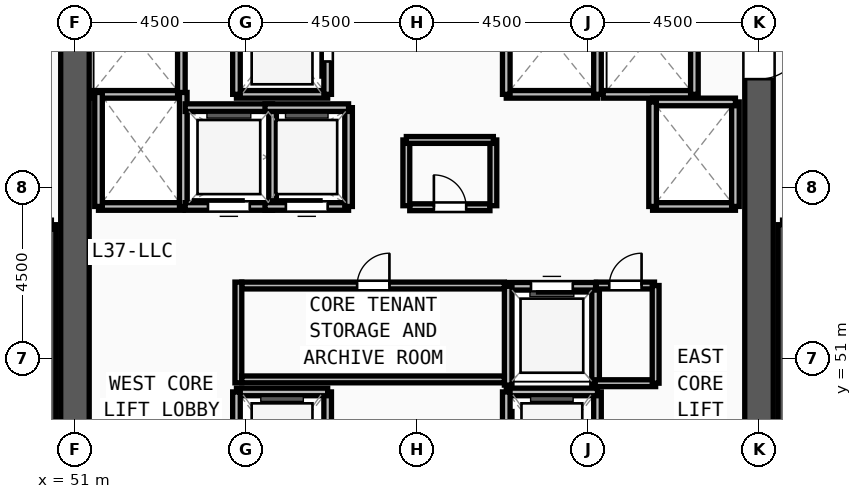
"""IFC4 building model, lengths in metres.
Left out: names, types, materials, properties, quantities, classifications, styles, units other than length and angle.
Written with IfcOpenShell. Run it as: python <this file> out.ifc"""

import sys

from ifc_helpers import new_model, si_unit, direction, frame, frame_2d, origin, place, context, subcontext, project, spatial, rectangle, extrude, source, transform, mapped, element, fill, save


model = new_model("IFC4")
c1 = context("Model", 3, precision=1e-05, world=origin(), true_north=direction((0.0, 1.0)))
c2 = subcontext(c1, "Body", "Model", "MODEL_VIEW")
j1 = project(units=[si_unit("LENGTHUNIT", "METRE"), si_unit("PLANEANGLEUNIT", "RADIAN")], contexts=[c1])
p1 = place(None, origin())
s1 = spatial("IfcSite", under=j1, at=p1, CompositionType="ELEMENT")
p2 = place(p1, origin())
s2 = spatial("IfcBuilding", under=s1, at=p2, CompositionType="ELEMENT")
p3 = place(p2, frame((0.0, 0.0, 144.0)))
s3 = spatial("IfcBuildingStorey", under=s2, at=p3, CompositionType="ELEMENT", Elevation=144.0)
p4 = place(p3, frame((69.0, 60.75, 0.0), z_axis=(0.0, 0.0, 1.0), x_axis=(0.0, -1.0, 0.0)))
e1 = element("IfcWall", 1, at=p4, inside=s3, PredefinedType="SHEAR", context=c2, shape_type="SweptSolid", body=[
    extrude(rectangle(XDim=13.5, YDim=0.75, at=frame_2d((6.75, 0.0))), origin(), (0.0, 0.0, 1.0), 3.57),
])
m1 = source(origin(), c2, "Body", "SweptSolid", [
    extrude(rectangle(XDim=1.2, YDim=2.2, at=frame_2d((0.6, 1.1))), frame((0.0, 0.385, 0.0), z_axis=(0.0, -1.0, 0.0), x_axis=(1.0, 0.0, 0.0)), (0.0, 0.0, 1.0), 0.77),
])
p5 = place(p4, frame((1.2, 0.0, 0.0)))
e2 = element("IfcOpeningElement", 2, at=p5, cuts=e1, PredefinedType="OPENING", context=c2, shape_type="MappedRepresentation", body=[
    mapped(m1, transform((0.0, 0.0, 0.0), x_axis=(1.0, 0.0, 0.0), y_axis=(0.0, 1.0, 0.0), z_axis=(0.0, 0.0, 1.0), scale=1.0)),
])
p6 = place(p3, frame((51.0, 47.25, 0.0), z_axis=(0.0, 0.0, 1.0), x_axis=(0.0, 1.0, 0.0)))
e3 = element("IfcWall", 3, at=p6, inside=s3, PredefinedType="SHEAR", context=c2, shape_type="SweptSolid", body=[
    extrude(rectangle(XDim=13.5, YDim=0.75, at=frame_2d((6.75, 0.0))), origin(), (0.0, 0.0, 1.0), 3.57),
])
for number, where, z_axis, x_axis in (
    (4, (50.38, 46.7, 0.0), (0.0, 0.0, 1.0), (0.0, 1.0, 0.0)),
    (5, (69.62, 54.52, 0.0), (0.0, 0.0, 1.0), (0.0, -1.0, 0.0)),
):
    element("IfcWall", number, at=place(p3, frame(where, z_axis=z_axis, x_axis=x_axis)), inside=s3, PredefinedType="SOLIDWALL", context=c2, shape_type="SweptSolid", body=[
        extrude(rectangle(XDim=7.82, YDim=0.24, at=frame_2d((3.91, 0.0))), origin(), (0.0, 0.0, 1.0), 3.57),
    ])
p7 = place(p3, frame((57.65, 47.12, 0.0), z_axis=(0.0, 0.0, 1.0), x_axis=(0.0, 1.0, 0.0)))
e6 = element("IfcWall", 6, at=p7, inside=s3, PredefinedType="SOLIDWALL", context=c2, shape_type="SweptSolid", body=[
    extrude(rectangle(XDim=3.0, YDim=0.2, at=frame_2d((1.5, 0.0))), origin(), (0.0, 0.0, 1.0), 3.57),
])
m2 = source(origin(), c2, "Body", "SweptSolid", [
    extrude(rectangle(XDim=1.2, YDim=2.3, at=frame_2d((0.6, 1.15))), frame((0.0, 0.11, 0.0), z_axis=(0.0, -1.0, 0.0), x_axis=(1.0, 0.0, 0.0)), (0.0, 0.0, 1.0), 0.22),
])
p8 = place(p7, frame((0.9, 0.0, 0.0)))
e7 = element("IfcOpeningElement", 7, at=p8, cuts=e6, PredefinedType="OPENING", context=c2, shape_type="MappedRepresentation", body=[
    mapped(m2, transform((0.0, 0.0, 0.0), x_axis=(1.0, 0.0, 0.0), y_axis=(0.0, 1.0, 0.0), z_axis=(0.0, 0.0, 1.0), scale=1.0)),
])
p9 = place(p3, frame((57.65, 50.12, 0.0), z_axis=(0.0, 0.0, 1.0), x_axis=(-1.0, 0.0, 0.0)))
e8 = element("IfcWall", 8, at=p9, inside=s3, PredefinedType="SOLIDWALL", context=c2, shape_type="SweptSolid", body=[
    extrude(rectangle(XDim=2.4, YDim=0.2, at=frame_2d((1.2, 0.0))), origin(), (0.0, 0.0, 1.0), 3.57),
])
for number, where, z_axis, x_axis in (
    (9, (55.25, 50.12, 0.0), (0.0, 0.0, 1.0), (0.0, -1.0, 0.0)),
    (10, (64.75, 47.12, 0.0), (0.0, 0.0, 1.0), (0.0, 1.0, 0.0)),
):
    element("IfcWall", number, at=place(p3, frame(where, z_axis=z_axis, x_axis=x_axis)), inside=s3, PredefinedType="SOLIDWALL", context=c2, shape_type="SweptSolid", body=[
        extrude(rectangle(XDim=3.0, YDim=0.2, at=frame_2d((1.5, 0.0))), origin(), (0.0, 0.0, 1.0), 3.57),
    ])
p10 = place(p3, frame((64.75, 50.12, 0.0), z_axis=(0.0, 0.0, 1.0), x_axis=(-1.0, 0.0, 0.0)))
e11 = element("IfcWall", 11, at=p10, inside=s3, PredefinedType="SOLIDWALL", context=c2, shape_type="SweptSolid", body=[
    extrude(rectangle(XDim=2.4, YDim=0.2, at=frame_2d((1.2, 0.0))), origin(), (0.0, 0.0, 1.0), 3.57),
])
p11 = place(p3, frame((62.35, 50.12, 0.0), z_axis=(0.0, 0.0, 1.0), x_axis=(0.0, -1.0, 0.0)))
e12 = element("IfcWall", 12, at=p11, inside=s3, PredefinedType="SOLIDWALL", context=c2, shape_type="SweptSolid", body=[
    extrude(rectangle(XDim=3.0, YDim=0.2, at=frame_2d((1.5, 0.0))), origin(), (0.0, 0.0, 1.0), 3.57),
])
p12 = place(p11, frame((0.9, 0.0, 0.0)))
e13 = element("IfcOpeningElement", 13, at=p12, cuts=e12, PredefinedType="OPENING", context=c2, shape_type="MappedRepresentation", body=[
    mapped(m2, transform((0.0, 0.0, 0.0), x_axis=(1.0, 0.0, 0.0), y_axis=(0.0, 1.0, 0.0), z_axis=(0.0, 0.0, 1.0), scale=1.0)),
])
p13 = place(p3, frame((55.25, 57.95, 0.0), z_axis=(0.0, 0.0, 1.0), x_axis=(1.0, 0.0, 0.0)))
e14 = element("IfcWall", 14, at=p13, inside=s3, PredefinedType="SOLIDWALL", context=c2, shape_type="SweptSolid", body=[
    extrude(rectangle(XDim=2.4, YDim=0.2, at=frame_2d((1.2, 0.0))), origin(), (0.0, 0.0, 1.0), 3.57),
])
p14 = place(p3, frame((57.65, 57.95, 0.0), z_axis=(0.0, 0.0, 1.0), x_axis=(0.0, 1.0, 0.0)))
e15 = element("IfcWall", 15, at=p14, inside=s3, PredefinedType="SOLIDWALL", context=c2, shape_type="SweptSolid", body=[
    extrude(rectangle(XDim=2.93, YDim=0.2, at=frame_2d((1.465, 0.0))), origin(), (0.0, 0.0, 1.0), 3.57),
])
p15 = place(p14, frame((0.865, 0.0, 0.0)))
e16 = element("IfcOpeningElement", 16, at=p15, cuts=e15, PredefinedType="OPENING", context=c2, shape_type="MappedRepresentation", body=[
    mapped(m2, transform((0.0, 0.0, 0.0), x_axis=(1.0, 0.0, 0.0), y_axis=(0.0, 1.0, 0.0), z_axis=(0.0, 0.0, 1.0), scale=1.0)),
])
p16 = place(p3, frame((55.25, 60.88, 0.0), z_axis=(0.0, 0.0, 1.0), x_axis=(0.0, -1.0, 0.0)))
e17 = element("IfcWall", 17, at=p16, inside=s3, PredefinedType="SOLIDWALL", context=c2, shape_type="SweptSolid", body=[
    extrude(rectangle(XDim=2.93, YDim=0.2, at=frame_2d((1.465, 0.0))), origin(), (0.0, 0.0, 1.0), 3.57),
])
p17 = place(p3, frame((62.35, 57.95, 0.0), z_axis=(0.0, 0.0, 1.0), x_axis=(1.0, 0.0, 0.0)))
e18 = element("IfcWall", 18, at=p17, inside=s3, PredefinedType="SOLIDWALL", context=c2, shape_type="SweptSolid", body=[
    extrude(rectangle(XDim=2.4, YDim=0.2, at=frame_2d((1.2, 0.0))), origin(), (0.0, 0.0, 1.0), 3.57),
])
for number, where, z_axis, x_axis in (
    (19, (64.75, 57.95, 0.0), (0.0, 0.0, 1.0), (0.0, 1.0, 0.0)),
    (20, (62.35, 60.88, 0.0), (0.0, 0.0, 1.0), (0.0, -1.0, 0.0)),
):
    element("IfcWall", number, at=place(p3, frame(where, z_axis=z_axis, x_axis=x_axis)), inside=s3, PredefinedType="SOLIDWALL", context=c2, shape_type="SweptSolid", body=[
        extrude(rectangle(XDim=2.93, YDim=0.2, at=frame_2d((1.465, 0.0))), origin(), (0.0, 0.0, 1.0), 3.57),
    ])
p18 = place(p3, frame((64.9, 57.95, 0.0), z_axis=(0.0, 0.0, 1.0), x_axis=(1.0, 0.0, 0.0)))
e21 = element("IfcWall", 21, at=p18, inside=s3, PredefinedType="SOLIDWALL", context=c2, shape_type="SweptSolid", body=[
    extrude(rectangle(XDim=2.4, YDim=0.2, at=frame_2d((1.2, 0.0))), origin(), (0.0, 0.0, 1.0), 3.57),
])
p19 = place(p3, frame((67.3, 57.95, 0.0), z_axis=(0.0, 0.0, 1.0), x_axis=(0.0, 1.0, 0.0)))
e22 = element("IfcWall", 22, at=p19, inside=s3, PredefinedType="SOLIDWALL", context=c2, shape_type="SweptSolid", body=[
    extrude(rectangle(XDim=2.93, YDim=0.2, at=frame_2d((1.465, 0.0))), origin(), (0.0, 0.0, 1.0), 3.57),
])
p20 = place(p3, frame((51.4, 57.95, 0.0), z_axis=(0.0, 0.0, 1.0), x_axis=(1.0, 0.0, 0.0)))
e23 = element("IfcWall", 23, at=p20, inside=s3, PredefinedType="SOLIDWALL", context=c2, shape_type="SweptSolid", body=[
    extrude(rectangle(XDim=2.4, YDim=0.2, at=frame_2d((1.2, 0.0))), origin(), (0.0, 0.0, 1.0), 3.57),
])
p21 = place(p3, frame((53.8, 57.95, 0.0), z_axis=(0.0, 0.0, 1.0), x_axis=(0.0, 1.0, 0.0)))
e24 = element("IfcWall", 24, at=p21, inside=s3, PredefinedType="SOLIDWALL", context=c2, shape_type="SweptSolid", body=[
    extrude(rectangle(XDim=2.93, YDim=0.2, at=frame_2d((1.465, 0.0))), origin(), (0.0, 0.0, 1.0), 3.57),
])
p22 = place(p3, frame((51.62, 55.0, 0.0), z_axis=(0.0, 0.0, 1.0), x_axis=(1.0, 0.0, 0.0)))
e25 = element("IfcWall", 25, at=p22, inside=s3, PredefinedType="SOLIDWALL", context=c2, shape_type="SweptSolid", body=[
    extrude(rectangle(XDim=2.23, YDim=0.2, at=frame_2d((1.115, 0.0))), origin(), (0.0, 0.0, 1.0), 3.57),
])
for number, where, z_axis, x_axis in (
    (26, (53.85, 55.0, 0.0), (0.0, 0.0, 1.0), (0.0, 1.0, 0.0)),
    (27, (51.62, 58.0, 0.0), (0.0, 0.0, 1.0), (0.0, -1.0, 0.0)),
):
    element("IfcWall", number, at=place(p3, frame(where, z_axis=z_axis, x_axis=x_axis)), inside=s3, PredefinedType="SOLIDWALL", context=c2, shape_type="SweptSolid", body=[
        extrude(rectangle(XDim=3.0, YDim=0.2, at=frame_2d((1.5, 0.0))), origin(), (0.0, 0.0, 1.0), 3.57),
    ])
p23 = place(p3, frame((66.2, 55.0, 0.0), z_axis=(0.0, 0.0, 1.0), x_axis=(1.0, 0.0, 0.0)))
e28 = element("IfcWall", 28, at=p23, inside=s3, PredefinedType="SOLIDWALL", context=c2, shape_type="SweptSolid", body=[
    extrude(rectangle(XDim=2.18, YDim=0.2, at=frame_2d((1.09, 0.0))), origin(), (0.0, 0.0, 1.0), 3.57),
])
p24 = place(p3, frame((68.38, 55.0, 0.0), z_axis=(0.0, 0.0, 1.0), x_axis=(0.0, 1.0, 0.0)))
e29 = element("IfcWall", 29, at=p24, inside=s3, PredefinedType="SOLIDWALL", context=c2, shape_type="SweptSolid", body=[
    extrude(rectangle(XDim=2.75, YDim=0.2, at=frame_2d((1.375, 0.0))), origin(), (0.0, 0.0, 1.0), 3.57),
])
p25 = place(p3, frame((68.38, 57.75, 0.0), z_axis=(0.0, 0.0, 1.0), x_axis=(-1.0, 0.0, 0.0)))
e30 = element("IfcWall", 30, at=p25, inside=s3, PredefinedType="SOLIDWALL", context=c2, shape_type="SweptSolid", body=[
    extrude(rectangle(XDim=2.18, YDim=0.2, at=frame_2d((1.09, 0.0))), origin(), (0.0, 0.0, 1.0), 3.57),
])
p26 = place(p3, frame((66.2, 57.75, 0.0), z_axis=(0.0, 0.0, 1.0), x_axis=(0.0, -1.0, 0.0)))
e31 = element("IfcWall", 31, at=p26, inside=s3, PredefinedType="SOLIDWALL", context=c2, shape_type="SweptSolid", body=[
    extrude(rectangle(XDim=2.75, YDim=0.2, at=frame_2d((1.375, 0.0))), origin(), (0.0, 0.0, 1.0), 3.57),
])
p27 = place(p3, frame((64.7, 50.3, 0.0), z_axis=(0.0, 0.0, 1.0), x_axis=(0.0, 1.0, 0.0)))
e32 = element("IfcWall", 32, at=p27, inside=s3, PredefinedType="SOLIDWALL", context=c2, shape_type="SweptSolid", body=[
    extrude(rectangle(XDim=2.6, YDim=0.2, at=frame_2d((1.3, 0.0))), origin(), (0.0, 0.0, 1.0), 3.57),
])
p28 = place(p3, frame((64.7, 52.9, 0.0), z_axis=(0.0, 0.0, 1.0), x_axis=(-1.0, 0.0, 0.0)))
e33 = element("IfcWall", 33, at=p28, inside=s3, PredefinedType="SOLIDWALL", context=c2, shape_type="SweptSolid", body=[
    extrude(rectangle(XDim=2.3, YDim=0.2, at=frame_2d((1.15, 0.0))), origin(), (0.0, 0.0, 1.0), 3.57),
])
m3 = source(origin(), c2, "Body", "SweptSolid", [
    extrude(rectangle(XDim=1.1, YDim=2.2, at=frame_2d((0.55, 1.1))), frame((0.0, 0.11, 0.0), z_axis=(0.0, -1.0, 0.0), x_axis=(1.0, 0.0, 0.0)), (0.0, 0.0, 1.0), 0.22),
])
p29 = place(p28, frame((0.6, 0.0, 0.0)))
e34 = element("IfcOpeningElement", 34, at=p29, cuts=e33, PredefinedType="OPENING", context=c2, shape_type="MappedRepresentation", body=[
    mapped(m3, transform((0.0, 0.0, 0.0), x_axis=(1.0, 0.0, 0.0), y_axis=(0.0, 1.0, 0.0), z_axis=(0.0, 0.0, 1.0), scale=1.0)),
])
p30 = place(p3, frame((62.4, 52.9, 0.0), z_axis=(0.0, 0.0, 1.0), x_axis=(0.0, -1.0, 0.0)))
e35 = element("IfcWall", 35, at=p30, inside=s3, PredefinedType="SOLIDWALL", context=c2, shape_type="SweptSolid", body=[
    extrude(rectangle(XDim=2.6, YDim=0.2, at=frame_2d((1.3, 0.0))), origin(), (0.0, 0.0, 1.0), 3.57),
])
p31 = place(p3, frame((53.9, 55.0, 0.0), z_axis=(0.0, 0.0, 1.0), x_axis=(1.0, 0.0, 0.0)))
e36 = element("IfcWall", 36, at=p31, inside=s3, PredefinedType="SOLIDWALL", context=c2, shape_type="SweptSolid", body=[
    extrude(rectangle(XDim=2.3, YDim=0.2, at=frame_2d((1.15, 0.0))), origin(), (0.0, 0.0, 1.0), 3.57),
])
p32 = place(p31, frame((0.6, 0.0, 0.0)))
e37 = element("IfcOpeningElement", 37, at=p32, cuts=e36, PredefinedType="OPENING", context=c2, shape_type="MappedRepresentation", body=[
    mapped(m3, transform((0.0, 0.0, 0.0), x_axis=(1.0, 0.0, 0.0), y_axis=(0.0, 1.0, 0.0), z_axis=(0.0, 0.0, 1.0), scale=1.0)),
])
p33 = place(p3, frame((56.2, 55.0, 0.0), z_axis=(0.0, 0.0, 1.0), x_axis=(0.0, 1.0, 0.0)))
e38 = element("IfcWall", 38, at=p33, inside=s3, PredefinedType="SOLIDWALL", context=c2, shape_type="SweptSolid", body=[
    extrude(rectangle(XDim=2.6, YDim=0.2, at=frame_2d((1.3, 0.0))), origin(), (0.0, 0.0, 1.0), 3.57),
])
p34 = place(p3, frame((56.2, 57.6, 0.0), z_axis=(0.0, 0.0, 1.0), x_axis=(-1.0, 0.0, 0.0)))
e39 = element("IfcWall", 39, at=p34, inside=s3, PredefinedType="SOLIDWALL", context=c2, shape_type="SweptSolid", body=[
    extrude(rectangle(XDim=2.3, YDim=0.2, at=frame_2d((1.15, 0.0))), origin(), (0.0, 0.0, 1.0), 3.57),
])
p35 = place(p3, frame((56.0, 55.0, 0.0), z_axis=(0.0, 0.0, 1.0), x_axis=(1.0, 0.0, 0.0)))
e40 = element("IfcWall", 40, at=p35, inside=s3, PredefinedType="SOLIDWALL", context=c2, shape_type="SweptSolid", body=[
    extrude(rectangle(XDim=2.2, YDim=0.2, at=frame_2d((1.1, 0.0))), origin(), (0.0, 0.0, 1.0), 3.57),
])
p36 = place(p35, frame((0.55, 0.0, 0.0)))
e41 = element("IfcOpeningElement", 41, at=p36, cuts=e40, PredefinedType="OPENING", context=c2, shape_type="MappedRepresentation", body=[
    mapped(m3, transform((0.0, 0.0, 0.0), x_axis=(1.0, 0.0, 0.0), y_axis=(0.0, 1.0, 0.0), z_axis=(0.0, 0.0, 1.0), scale=1.0)),
])
p37 = place(p3, frame((58.2, 55.0, 0.0), z_axis=(0.0, 0.0, 1.0), x_axis=(0.0, 1.0, 0.0)))
e42 = element("IfcWall", 42, at=p37, inside=s3, PredefinedType="SOLIDWALL", context=c2, shape_type="SweptSolid", body=[
    extrude(rectangle(XDim=2.6, YDim=0.2, at=frame_2d((1.3, 0.0))), origin(), (0.0, 0.0, 1.0), 3.57),
])
p38 = place(p3, frame((58.2, 57.6, 0.0), z_axis=(0.0, 0.0, 1.0), x_axis=(-1.0, 0.0, 0.0)))
e43 = element("IfcWall", 43, at=p38, inside=s3, PredefinedType="SOLIDWALL", context=c2, shape_type="SweptSolid", body=[
    extrude(rectangle(XDim=2.2, YDim=0.2, at=frame_2d((1.1, 0.0))), origin(), (0.0, 0.0, 1.0), 3.57),
])
p39 = place(p3, frame((55.39, 52.92, 0.0), z_axis=(0.0, 0.0, 1.0), x_axis=(1.0, 0.0, 0.0)))
e44 = element("IfcWall", 44, at=p39, inside=s3, PredefinedType="PARTITIONING", context=c2, shape_type="SweptSolid", body=[
    extrude(rectangle(XDim=6.91, YDim=0.18, at=frame_2d((3.455, 0.0))), origin(), (0.0, 0.0, 1.0), 3.57),
])
m4 = source(origin(), c2, "Body", "SweptSolid", [
    extrude(rectangle(XDim=0.85, YDim=2.1, at=frame_2d((0.425, 1.05))), frame((0.0, 0.1, 0.0), z_axis=(0.0, -1.0, 0.0), x_axis=(1.0, 0.0, 0.0)), (0.0, 0.0, 1.0), 0.2),
])
p40 = place(p39, frame((3.035, 0.0, 0.0)))
e45 = element("IfcOpeningElement", 45, at=p40, cuts=e44, PredefinedType="OPENING", context=c2, shape_type="MappedRepresentation", body=[
    mapped(m4, transform((0.0, 0.0, 0.0), x_axis=(1.0, 0.0, 0.0), y_axis=(0.0, 1.0, 0.0), z_axis=(0.0, 0.0, 1.0), scale=1.0)),
])
p41 = place(p3, frame((59.81, 54.98, 0.0), z_axis=(0.0, 0.0, 1.0), x_axis=(1.0, 0.0, 0.0)))
e46 = element("IfcWall", 46, at=p41, inside=s3, PredefinedType="PARTITIONING", context=c2, shape_type="SweptSolid", body=[
    extrude(rectangle(XDim=2.11, YDim=0.18, at=frame_2d((1.055, 0.0))), origin(), (0.0, 0.0, 1.0), 3.57),
])
p42 = place(p41, frame((0.635, 0.0, 0.0)))
e47 = element("IfcOpeningElement", 47, at=p42, cuts=e46, PredefinedType="OPENING", context=c2, shape_type="MappedRepresentation", body=[
    mapped(m4, transform((0.0, 0.0, 0.0), x_axis=(1.0, 0.0, 0.0), y_axis=(0.0, 1.0, 0.0), z_axis=(0.0, 0.0, 1.0), scale=1.0)),
])
p43 = place(p3, frame((64.72, 52.92, 0.0), z_axis=(0.0, 0.0, 1.0), x_axis=(1.0, 0.0, 0.0)))
e48 = element("IfcWall", 48, at=p43, inside=s3, PredefinedType="PARTITIONING", context=c2, shape_type="SweptSolid", body=[
    extrude(rectangle(XDim=1.53, YDim=0.18, at=frame_2d((0.765, 0.0))), origin(), (0.0, 0.0, 1.0), 3.57),
])
p44 = place(p43, frame((0.34, 0.0, 0.0)))
e49 = element("IfcOpeningElement", 49, at=p44, cuts=e48, PredefinedType="OPENING", context=c2, shape_type="MappedRepresentation", body=[
    mapped(m4, transform((0.0, 0.0, 0.0), x_axis=(1.0, 0.0, 0.0), y_axis=(0.0, 1.0, 0.0), z_axis=(0.0, 0.0, 1.0), scale=1.0)),
])
for number, where, z_axis, x_axis in (
    (50, (59.72, 55.02, 0.0), (0.0, 0.0, 1.0), (0.0, 1.0, 0.0)),
    (51, (62.01, 55.02, 0.0), (0.0, 0.0, 1.0), (0.0, 1.0, 0.0)),
):
    element("IfcWall", number, at=place(p3, frame(where, z_axis=z_axis, x_axis=x_axis)), inside=s3, PredefinedType="PARTITIONING", context=c2, shape_type="SweptSolid", body=[
        extrude(rectangle(XDim=1.73, YDim=0.18, at=frame_2d((0.865, 0.0))), origin(), (0.0, 0.0, 1.0), 3.57),
    ])
p45 = place(p3, frame((59.72, 56.75, 0.0), z_axis=(0.0, 0.0, 1.0), x_axis=(1.0, 0.0, 0.0)))
e52 = element("IfcWall", 52, at=p45, inside=s3, PredefinedType="PARTITIONING", context=c2, shape_type="SweptSolid", body=[
    extrude(rectangle(XDim=2.29, YDim=0.18, at=frame_2d((1.145, 0.0))), origin(), (0.0, 0.0, 1.0), 3.57),
])
p46 = place(p3, frame((64.69, 50.35, 0.0), z_axis=(0.0, 0.0, 1.0), x_axis=(1.0, 0.0, 0.0)))
e53 = element("IfcWall", 53, at=p46, inside=s3, PredefinedType="PARTITIONING", context=c2, shape_type="SweptSolid", body=[
    extrude(rectangle(XDim=1.59, YDim=0.18, at=frame_2d((0.795, 0.0))), origin(), (0.0, 0.0, 1.0), 3.57),
])
p47 = place(p3, frame((66.28, 50.35, 0.0), z_axis=(0.0, 0.0, 1.0), x_axis=(0.0, 1.0, 0.0)))
e54 = element("IfcWall", 54, at=p47, inside=s3, PredefinedType="PARTITIONING", context=c2, shape_type="SweptSolid", body=[
    extrude(rectangle(XDim=2.57, YDim=0.18, at=frame_2d((1.285, 0.0))), origin(), (0.0, 0.0, 1.0), 3.57),
])
p48 = place(p3, frame((55.3, 50.36, 0.0), z_axis=(0.0, 0.0, 1.0), x_axis=(0.0, 1.0, 0.0)))
e55 = element("IfcWall", 55, at=p48, inside=s3, PredefinedType="PARTITIONING", context=c2, shape_type="SweptSolid", body=[
    extrude(rectangle(XDim=2.65, YDim=0.18, at=frame_2d((1.325, 0.0))), origin(), (0.0, 0.0, 1.0), 3.57),
])
p49 = place(p3, frame((55.39, 50.45, 0.0), z_axis=(0.0, 0.0, 1.0), x_axis=(1.0, 0.0, 0.0)))
e56 = element("IfcWall", 56, at=p49, inside=s3, PredefinedType="PARTITIONING", context=c2, shape_type="SweptSolid", body=[
    extrude(rectangle(XDim=6.91, YDim=0.18, at=frame_2d((3.455, 0.0))), origin(), (0.0, 0.0, 1.0), 3.57),
])
m5 = source(origin(), c2, "Body", "SweptSolid", [
    extrude(rectangle(XDim=1.2, YDim=2.2, at=frame_2d((0.6, 1.1))), frame((0.0, 0.025, 0.0), z_axis=(0.0, -1.0, 0.0), x_axis=(1.0, 0.0, 0.0)), (0.0, 0.0, 1.0), 0.05),
])
p50 = place(p5, origin())
e57 = element("IfcDoor", 57, at=p50, inside=s3, OperationType="SINGLE_SWING_LEFT", PredefinedType="DOOR", context=c2, shape_type="MappedRepresentation", body=[
    mapped(m5, transform((0.0, 0.0, 0.0), x_axis=(1.0, 0.0, 0.0), y_axis=(0.0, 1.0, 0.0), z_axis=(0.0, 0.0, 1.0), scale=1.0)),
])
fill(e2, e57)
m6 = source(origin(), c2, "Body", "SweptSolid", [
    extrude(rectangle(XDim=1.2, YDim=2.3, at=frame_2d((0.6, 1.15))), frame((0.0, 0.025, 0.0), z_axis=(0.0, -1.0, 0.0), x_axis=(1.0, 0.0, 0.0)), (0.0, 0.0, 1.0), 0.05),
])
p51 = place(p15, origin())
e58 = element("IfcDoor", 58, at=p51, inside=s3, OperationType="SLIDING_TO_LEFT", PredefinedType="DOOR", context=c2, shape_type="MappedRepresentation", body=[
    mapped(m6, transform((0.0, 0.0, 0.0), x_axis=(1.0, 0.0, 0.0), y_axis=(0.0, 1.0, 0.0), z_axis=(0.0, 0.0, 1.0), scale=1.0)),
])
fill(e16, e58)
m7 = source(origin(), c2, "Body", "SweptSolid", [
    extrude(rectangle(XDim=1.1, YDim=2.2, at=frame_2d((0.55, 1.1))), frame((0.0, 0.025, 0.0), z_axis=(0.0, -1.0, 0.0), x_axis=(1.0, 0.0, 0.0)), (0.0, 0.0, 1.0), 0.05),
])
p52 = place(p29, origin())
e59 = element("IfcDoor", 59, at=p52, inside=s3, OperationType="SLIDING_TO_LEFT", PredefinedType="DOOR", context=c2, shape_type="MappedRepresentation", body=[
    mapped(m7, transform((0.0, 0.0, 0.0), x_axis=(1.0, 0.0, 0.0), y_axis=(0.0, 1.0, 0.0), z_axis=(0.0, 0.0, 1.0), scale=1.0)),
])
fill(e34, e59)
p53 = place(p32, origin())
e60 = element("IfcDoor", 60, at=p53, inside=s3, OperationType="SLIDING_TO_LEFT", PredefinedType="DOOR", context=c2, shape_type="MappedRepresentation", body=[
    mapped(m7, transform((0.0, 0.0, 0.0), x_axis=(1.0, 0.0, 0.0), y_axis=(0.0, 1.0, 0.0), z_axis=(0.0, 0.0, 1.0), scale=1.0)),
])
fill(e37, e60)
p54 = place(p36, origin())
e61 = element("IfcDoor", 61, at=p54, inside=s3, OperationType="SLIDING_TO_LEFT", PredefinedType="DOOR", context=c2, shape_type="MappedRepresentation", body=[
    mapped(m7, transform((0.0, 0.0, 0.0), x_axis=(1.0, 0.0, 0.0), y_axis=(0.0, 1.0, 0.0), z_axis=(0.0, 0.0, 1.0), scale=1.0)),
])
fill(e41, e61)
m8 = source(origin(), c2, "Body", "SweptSolid", [
    extrude(rectangle(XDim=0.85, YDim=2.1, at=frame_2d((0.425, 1.05))), frame((0.0, 0.025, 0.0), z_axis=(0.0, -1.0, 0.0), x_axis=(1.0, 0.0, 0.0)), (0.0, 0.0, 1.0), 0.05),
])
p55 = place(p40, origin())
e62 = element("IfcDoor", 62, at=p55, inside=s3, OperationType="SINGLE_SWING_RIGHT", PredefinedType="DOOR", context=c2, shape_type="MappedRepresentation", body=[
    mapped(m8, transform((0.0, 0.0, 0.0), x_axis=(1.0, 0.0, 0.0), y_axis=(0.0, 1.0, 0.0), z_axis=(0.0, 0.0, 1.0), scale=1.0)),
])
fill(e45, e62)
p56 = place(p42, origin())
e63 = element("IfcDoor", 63, at=p56, inside=s3, OperationType="SINGLE_SWING_LEFT", PredefinedType="DOOR", context=c2, shape_type="MappedRepresentation", body=[
    mapped(m8, transform((0.0, 0.0, 0.0), x_axis=(1.0, 0.0, 0.0), y_axis=(0.0, 1.0, 0.0), z_axis=(0.0, 0.0, 1.0), scale=1.0)),
])
fill(e47, e63)
p57 = place(p44, origin())
e64 = element("IfcDoor", 64, at=p57, inside=s3, OperationType="SINGLE_SWING_RIGHT", PredefinedType="DOOR", context=c2, shape_type="MappedRepresentation", body=[
    mapped(m8, transform((0.0, 0.0, 0.0), x_axis=(1.0, 0.0, 0.0), y_axis=(0.0, 1.0, 0.0), z_axis=(0.0, 0.0, 1.0), scale=1.0)),
])
fill(e49, e64)
save(model, sys.argv[1])
